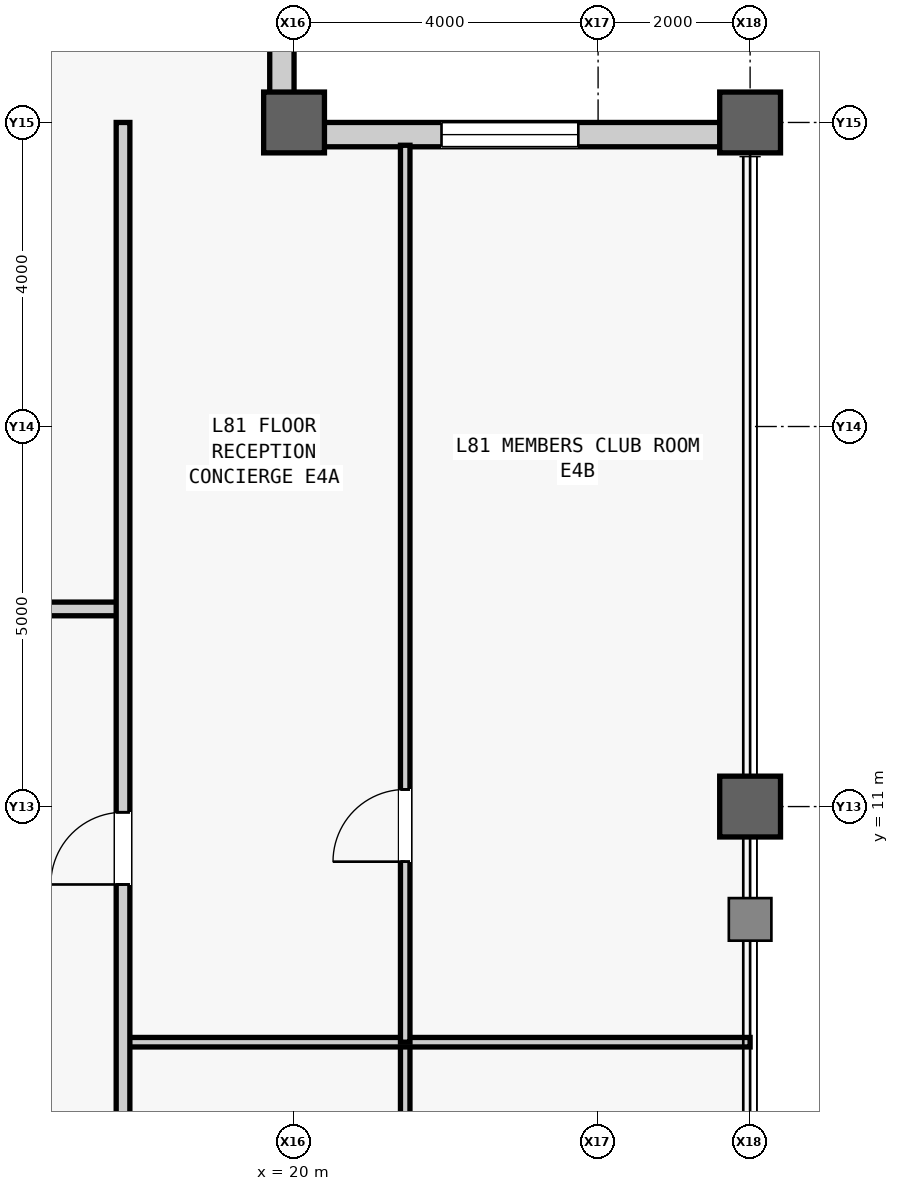
"""IFC4 building model, lengths in metres.
Left out: names, types, materials, properties, quantities, classifications, styles, units other than length and angle.
Written with IfcOpenShell. Run it as: python <this file> out.ifc"""

import sys

from ifc_helpers import new_model, si_unit, direction, frame, frame_2d, origin, origin_2d, place, context, subcontext, project, spatial, rectangle, hollow_rectangle, extrude, source, transform, mapped, element, fill, save


model = new_model("IFC4")
c1 = context("Model", 3, precision=1e-05, world=origin(), true_north=direction((0.0, 1.0)))
c2 = subcontext(c1, "Body", "Model", "MODEL_VIEW")
j1 = project(units=[si_unit("LENGTHUNIT", "METRE"), si_unit("PLANEANGLEUNIT", "RADIAN")], contexts=[c1])
p1 = place(None, origin())
s1 = spatial("IfcSite", under=j1, at=p1, CompositionType="ELEMENT")
p2 = place(p1, origin())
s2 = spatial("IfcBuilding", under=s1, at=p2, CompositionType="ELEMENT")
p3 = place(p2, frame((0.0, 0.0, 342.3)))
s3 = spatial("IfcBuildingStorey", under=s2, at=p3, CompositionType="ELEMENT", Elevation=342.3)
m1 = source(origin(), c2, "Body", "SweptSolid", [
    extrude(hollow_rectangle(XDim=0.8, YDim=0.8, WallThickness=0.045, at=origin_2d()), origin(), (0.0, 0.0, 1.0), 4.0),
])
for number, where, z_axis, x_axis in (
    (1, (20.0, 20.0, 0.0), (0.0, 0.0, 1.0), (1.0, 0.0, 0.0)),
    (2, (26.0, 11.0, 0.0), (0.0, 0.0, 1.0), (1.0, 0.0, 0.0)),
    (3, (26.0, 20.0, 0.0), (0.0, 0.0, 1.0), (1.0, 0.0, 0.0)),
):
    element("IfcColumn", number, at=place(p3, frame(where, z_axis=z_axis, x_axis=x_axis)), inside=s3, PredefinedType="COLUMN", context=c2, shape_type="MappedRepresentation", body=[
        mapped(m1, transform((0.0, 0.0, 0.0), scale=1.0)),
    ])
m2 = source(origin(), c2, "Body", "SweptSolid", [
    extrude(rectangle(XDim=5.68, YDim=0.32, at=frame_2d((2.84, 0.0))), origin(), (0.0, 0.0, 1.0), 3.151),
])
p4 = place(p3, frame((20.0, 19.84, 0.0), z_axis=(0.0, 0.0, 1.0), x_axis=(1.0, 0.0, 0.0)))
e4 = element("IfcWall", 4, at=p4, inside=s3, PredefinedType="STANDARD", context=c2, shape_type="MappedRepresentation", body=[
    mapped(m2, transform((0.0, 0.0, 0.0), scale=1.0)),
])
m3 = source(origin(), c2, "Body", "SweptSolid", [
    extrude(rectangle(XDim=1.8, YDim=2.4, at=frame_2d((0.9, 1.2))), frame((0.0, 0.17, 0.0), z_axis=(0.0, -1.0, 0.0), x_axis=(1.0, 0.0, 0.0)), (0.0, 0.0, 1.0), 0.34),
])
p5 = place(p4, frame((1.94, 0.0, 0.5)))
e5 = element("IfcOpeningElement", 5, at=p5, cuts=e4, PredefinedType="OPENING", context=c2, shape_type="MappedRepresentation", body=[
    mapped(m3, transform((0.0, 0.0, 0.0), scale=1.0)),
])
p6 = place(p3, frame((19.84, 20.0, 0.0), z_axis=(0.0, 0.0, 1.0), x_axis=(0.0, 1.0, 0.0)))
e6 = element("IfcWall", 6, at=p6, inside=s3, PredefinedType="STANDARD", context=c2, shape_type="MappedRepresentation", body=[
    mapped(m2, transform((0.0, 0.0, 0.0), scale=1.0)),
])
p7 = place(p6, frame((1.94, 0.0, 0.5)))
e7 = element("IfcOpeningElement", 7, at=p7, cuts=e6, PredefinedType="OPENING", context=c2, shape_type="MappedRepresentation", body=[
    mapped(m3, transform((0.0, 0.0, 0.0), scale=1.0)),
])
m4 = source(origin(), c2, "Body", "SweptSolid", [
    extrude(rectangle(XDim=2.4, YDim=0.18, at=frame_2d((1.2, 0.0))), origin(), (0.0, 0.0, 1.0), 3.7),
])
p8 = place(p3, frame((15.35, 13.6, 0.0), z_axis=(0.0, 0.0, 1.0), x_axis=(1.0, 0.0, 0.0)))
e8 = element("IfcWall", 8, at=p8, inside=s3, PredefinedType="PARTITIONING", context=c2, shape_type="MappedRepresentation", body=[
    mapped(m4, transform((0.0, 0.0, 0.0), scale=1.0)),
])
m5 = source(origin(), c2, "Body", "SweptSolid", [
    extrude(rectangle(XDim=7.41, YDim=0.125, at=frame_2d((3.705, 0.0))), origin(), (0.0, 0.0, 1.0), 3.7),
])
p9 = place(p3, frame((21.462, 0.49, 0.0), z_axis=(0.0, 0.0, 1.0), x_axis=(0.0, 1.0, 0.0)))
e9 = element("IfcWall", 9, at=p9, inside=s3, PredefinedType="PARTITIONING", context=c2, shape_type="MappedRepresentation", body=[
    mapped(m5, transform((0.0, 0.0, 0.0), scale=1.0)),
])
m6 = source(origin(), c2, "Body", "SweptSolid", [
    extrude(rectangle(XDim=0.95, YDim=2.15, at=frame_2d((0.475, 1.075))), frame((0.0, 0.073, 0.0), z_axis=(0.0, -1.0, 0.0), x_axis=(1.0, 0.0, 0.0)), (0.0, 0.0, 1.0), 0.145),
])
p10 = place(p9, frame((3.23, 0.0, 0.0)))
e10 = element("IfcOpeningElement", 10, at=p10, cuts=e9, PredefinedType="OPENING", context=c2, shape_type="MappedRepresentation", body=[
    mapped(m6, transform((0.0, 0.0, 0.0), scale=1.0)),
])
m7 = source(origin(), c2, "Body", "SweptSolid", [
    extrude(rectangle(XDim=8.25, YDim=0.125, at=frame_2d((4.125, 0.0))), origin(), (0.0, 0.0, 1.0), 3.7),
])
p11 = place(p3, frame((17.75, 7.9, 0.0), z_axis=(0.0, 0.0, 1.0), x_axis=(1.0, 0.0, 0.0)))
e11 = element("IfcWall", 11, at=p11, inside=s3, PredefinedType="PARTITIONING", context=c2, shape_type="MappedRepresentation", body=[
    mapped(m7, transform((0.0, 0.0, 0.0), scale=1.0)),
])
m8 = source(origin(), c2, "Body", "SweptSolid", [
    extrude(rectangle(XDim=11.8, YDim=0.125, at=frame_2d((5.9, 0.0))), origin(), (0.0, 0.0, 1.0), 3.7),
])
p12 = place(p3, frame((21.462, 7.9, 0.0), z_axis=(0.0, 0.0, 1.0), x_axis=(0.0, 1.0, 0.0)))
e12 = element("IfcWall", 12, at=p12, inside=s3, PredefinedType="PARTITIONING", context=c2, shape_type="MappedRepresentation", body=[
    mapped(m8, transform((0.0, 0.0, 0.0), scale=1.0)),
])
p13 = place(p12, frame((2.375, 0.0, 0.0)))
e13 = element("IfcOpeningElement", 13, at=p13, cuts=e12, PredefinedType="OPENING", context=c2, shape_type="MappedRepresentation", body=[
    mapped(m6, transform((0.0, 0.0, 0.0), scale=1.0)),
])
m9 = source(origin(), c2, "Body", "SweptSolid", [
    extrude(rectangle(XDim=37.3, YDim=0.18, at=frame_2d((18.65, 0.0))), origin(), (0.0, 0.0, 1.0), 3.7),
])
p14 = place(p3, frame((17.75, -17.3, 0.0), z_axis=(0.0, 0.0, 1.0), x_axis=(0.0, 1.0, 0.0)))
e14 = element("IfcWall", 14, at=p14, inside=s3, PredefinedType="PARTITIONING", context=c2, shape_type="MappedRepresentation", body=[
    mapped(m9, transform((0.0, 0.0, 0.0), scale=1.0)),
])
m10 = source(origin(), c2, "Body", "SweptSolid", [
    extrude(rectangle(XDim=0.95, YDim=2.15, at=frame_2d((0.475, 1.075))), frame((0.0, 0.1, 0.0), z_axis=(0.0, -1.0, 0.0), x_axis=(1.0, 0.0, 0.0)), (0.0, 0.0, 1.0), 0.2),
])
p15 = place(p14, frame((5.645, 0.0, 0.0)))
e15 = element("IfcOpeningElement", 15, at=p15, cuts=e14, PredefinedType="OPENING", context=c2, shape_type="MappedRepresentation", body=[
    mapped(m10, transform((0.0, 0.0, 0.0), scale=1.0)),
])
p16 = place(p14, frame((13.04, 0.0, 0.0)))
e16 = element("IfcOpeningElement", 16, at=p16, cuts=e14, PredefinedType="OPENING", context=c2, shape_type="MappedRepresentation", body=[
    mapped(m10, transform((0.0, 0.0, 0.0), scale=1.0)),
])
p17 = place(p14, frame((21.02, 0.0, 0.0)))
e17 = element("IfcOpeningElement", 17, at=p17, cuts=e14, PredefinedType="OPENING", context=c2, shape_type="MappedRepresentation", body=[
    mapped(m10, transform((0.0, 0.0, 0.0), scale=1.0)),
])
p18 = place(p14, frame((27.275, 0.0, 0.0)))
e18 = element("IfcOpeningElement", 18, at=p18, cuts=e14, PredefinedType="OPENING", context=c2, shape_type="MappedRepresentation", body=[
    mapped(m10, transform((0.0, 0.0, 0.0), scale=1.0)),
])
m11 = source(origin(), c2, "Body", "SweptSolid", [
    extrude(rectangle(XDim=1.8, YDim=2.4, at=frame_2d((0.9, 1.2))), frame((0.0, 0.03, 0.0), z_axis=(0.0, -1.0, 0.0), x_axis=(1.0, 0.0, 0.0)), (0.0, 0.0, 1.0), 0.06),
])
p19 = place(p5, origin())
e19 = element("IfcWindow", 19, at=p19, inside=s3, PartitioningType="SINGLE_PANEL", PredefinedType="WINDOW", context=c2, shape_type="MappedRepresentation", body=[
    mapped(m11, transform((0.0, 0.0, 0.0), scale=1.0)),
])
fill(e5, e19)
m12 = source(origin(), c2, "Body", "SweptSolid", [
    extrude(rectangle(XDim=0.95, YDim=2.15, at=frame_2d((0.475, 1.075))), frame((0.0, 0.025, 0.0), z_axis=(0.0, -1.0, 0.0), x_axis=(1.0, 0.0, 0.0)), (0.0, 0.0, 1.0), 0.05),
])
p20 = place(p13, origin())
e20 = element("IfcDoor", 20, at=p20, inside=s3, OperationType="SINGLE_SWING_LEFT", PredefinedType="DOOR", context=c2, shape_type="MappedRepresentation", body=[
    mapped(m12, transform((0.0, 0.0, 0.0), scale=1.0)),
])
fill(e13, e20)
p21 = place(p18, origin())
e21 = element("IfcDoor", 21, at=p21, inside=s3, OperationType="SINGLE_SWING_LEFT", PredefinedType="DOOR", context=c2, shape_type="MappedRepresentation", body=[
    mapped(m12, transform((0.0, 0.0, 0.0), scale=1.0)),
])
fill(e18, e21)
save(model, sys.argv[1])
